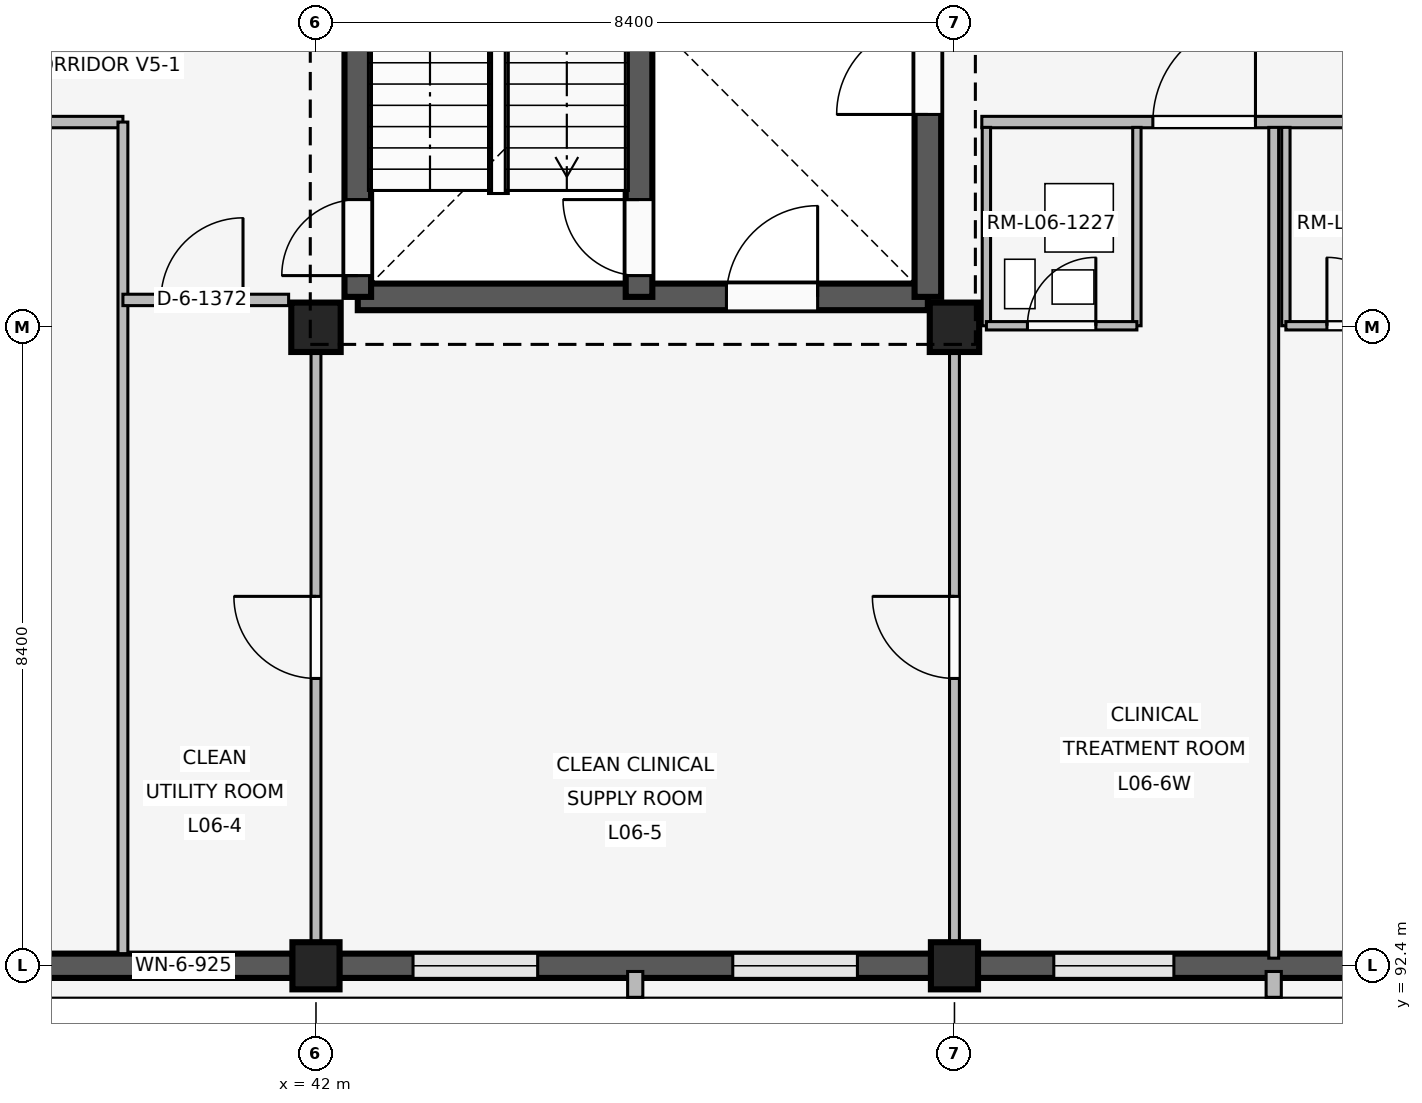
"""IFC4 building model, lengths in metres.
Left out: names, types, materials, properties, quantities, classifications, styles, units other than length and angle.
Written with IfcOpenShell. Run it as: python <this file> out.ifc"""

import sys

from ifc_helpers import new_model, si_unit, direction, frame, frame_2d, origin, origin_2d, place, context, subcontext, project, spatial, rectangle, extrude, element, fill, save


model = new_model("IFC4")
c1 = context("Model", 3, precision=1e-05, world=origin(), true_north=direction((0.0, 1.0)))
c2 = subcontext(c1, "Body", "Model", "MODEL_VIEW")
j1 = project(units=[si_unit("LENGTHUNIT", "METRE"), si_unit("PLANEANGLEUNIT", "RADIAN")], contexts=[c1])
p1 = place(None, origin())
s1 = spatial("IfcSite", under=j1, at=p1, CompositionType="ELEMENT")
p2 = place(p1, origin())
s2 = spatial("IfcBuilding", under=s1, at=p2, CompositionType="ELEMENT")
p3 = place(p2, frame((0.0, 0.0, 24.6)))
s3 = spatial("IfcBuildingStorey", under=s2, at=p3, CompositionType="ELEMENT", Elevation=24.6)
p4 = place(p3, frame((42.0, 92.4, 0.0), z_axis=(0.0, 0.0, 1.0), x_axis=(1.0, 0.0, 0.0)))
e1 = element("IfcColumn", 1, at=p4, inside=s3, PredefinedType="COLUMN", context=c2, shape_type="SweptSolid", body=[
    extrude(rectangle(XDim=0.62, YDim=0.62, at=origin_2d()), origin(), (0.0, 0.0, 1.0), 4.2),
])
p5 = place(p3, frame((42.0, 100.8, 0.0), z_axis=(0.0, 0.0, 1.0), x_axis=(1.0, 0.0, 0.0)))
e2 = element("IfcColumn", 2, at=p5, inside=s3, PredefinedType="COLUMN", context=c2, shape_type="SweptSolid", body=[
    extrude(rectangle(XDim=0.65, YDim=0.65, at=origin_2d()), origin(), (0.0, 0.0, 1.0), 4.2),
])
p6 = place(p3, frame((50.4, 92.4, 0.0), z_axis=(0.0, 0.0, 1.0), x_axis=(1.0, 0.0, 0.0)))
e3 = element("IfcColumn", 3, at=p6, inside=s3, PredefinedType="COLUMN", context=c2, shape_type="SweptSolid", body=[
    extrude(rectangle(XDim=0.62, YDim=0.62, at=origin_2d()), origin(), (0.0, 0.0, 1.0), 4.2),
])
p7 = place(p3, frame((50.4, 100.8, 0.0), z_axis=(0.0, 0.0, 1.0), x_axis=(1.0, 0.0, 0.0)))
e4 = element("IfcColumn", 4, at=p7, inside=s3, PredefinedType="COLUMN", context=c2, shape_type="SweptSolid", body=[
    extrude(rectangle(XDim=0.65, YDim=0.65, at=origin_2d()), origin(), (0.0, 0.0, 1.0), 4.2),
])
p8 = place(p3, frame((41.695, 92.4, 0.0), z_axis=(0.0, 0.0, 1.0), x_axis=(-1.0, 0.0, 0.0)))
e5 = element("IfcWall", 5, at=p8, inside=s3, PredefinedType="SOLIDWALL", context=c2, shape_type="SweptSolid", body=[
    extrude(rectangle(XDim=7.79, YDim=0.32, at=frame_2d((3.895, 0.0))), origin(), (0.0, 0.0, 1.0), 3.34),
])
p9 = place(p8, frame((0.89, 0.0, 0.85)))
e6 = element("IfcOpeningElement", 6, at=p9, cuts=e5, PredefinedType="OPENING", context=c2, shape_type="SweptSolid", body=[
    extrude(rectangle(XDim=1.1, YDim=1.6, at=frame_2d((0.55, 0.8))), frame((0.0, 0.17, 0.0), z_axis=(0.0, -1.0, 0.0), x_axis=(1.0, 0.0, 0.0)), (0.0, 0.0, 1.0), 0.34),
])
p10 = place(p8, frame((5.448, 0.0, 0.85)))
e7 = element("IfcOpeningElement", 7, at=p10, cuts=e5, PredefinedType="OPENING", context=c2, shape_type="SweptSolid", body=[
    extrude(rectangle(XDim=1.1, YDim=1.6, at=frame_2d((0.55, 0.8))), frame((0.0, 0.17, 0.0), z_axis=(0.0, -1.0, 0.0), x_axis=(1.0, 0.0, 0.0)), (0.0, 0.0, 1.0), 0.34),
])
p11 = place(p3, frame((50.095, 92.4, 0.0), z_axis=(0.0, 0.0, 1.0), x_axis=(-1.0, 0.0, 0.0)))
e8 = element("IfcWall", 8, at=p11, inside=s3, PredefinedType="SOLIDWALL", context=c2, shape_type="SweptSolid", body=[
    extrude(rectangle(XDim=7.79, YDim=0.32, at=frame_2d((3.895, 0.0))), origin(), (0.0, 0.0, 1.0), 3.34),
])
p12 = place(p11, frame((0.972, 0.0, 0.85)))
e9 = element("IfcOpeningElement", 9, at=p12, cuts=e8, PredefinedType="OPENING", context=c2, shape_type="SweptSolid", body=[
    extrude(rectangle(XDim=1.64, YDim=1.75, at=frame_2d((0.82, 0.875))), frame((0.0, 0.17, 0.0), z_axis=(0.0, -1.0, 0.0), x_axis=(1.0, 0.0, 0.0)), (0.0, 0.0, 1.0), 0.34),
])
p13 = place(p11, frame((5.178, 0.0, 0.85)))
e10 = element("IfcOpeningElement", 10, at=p13, cuts=e8, PredefinedType="OPENING", context=c2, shape_type="SweptSolid", body=[
    extrude(rectangle(XDim=1.64, YDim=1.75, at=frame_2d((0.82, 0.875))), frame((0.0, 0.17, 0.0), z_axis=(0.0, -1.0, 0.0), x_axis=(1.0, 0.0, 0.0)), (0.0, 0.0, 1.0), 0.34),
])
p14 = place(p3, frame((46.2, 92.325, 0.0), z_axis=(0.0, 0.0, 1.0), x_axis=(0.0, -1.0, 0.0)))
e11 = element("IfcWall", 11, at=p14, inside=s3, PredefinedType="ELEMENTEDWALL", context=c2, shape_type="SweptSolid", body=[
    extrude(rectangle(XDim=0.34, YDim=0.2, at=frame_2d((0.17, 0.0))), origin(), (0.0, 0.0, 1.0), 3.32),
])
p15 = place(p3, frame((58.495, 92.4, 0.0), z_axis=(0.0, 0.0, 1.0), x_axis=(-1.0, 0.0, 0.0)))
e12 = element("IfcWall", 12, at=p15, inside=s3, PredefinedType="SOLIDWALL", context=c2, shape_type="SweptSolid", body=[
    extrude(rectangle(XDim=7.79, YDim=0.32, at=frame_2d((3.895, 0.0))), origin(), (0.0, 0.0, 1.0), 3.34),
])
p16 = place(p15, frame((1.002, 0.0, 0.85)))
e13 = element("IfcOpeningElement", 13, at=p16, cuts=e12, PredefinedType="OPENING", context=c2, shape_type="SweptSolid", body=[
    extrude(rectangle(XDim=1.58, YDim=1.7, at=frame_2d((0.79, 0.85))), frame((0.0, 0.17, 0.0), z_axis=(0.0, -1.0, 0.0), x_axis=(1.0, 0.0, 0.0)), (0.0, 0.0, 1.0), 0.34),
])
p17 = place(p15, frame((5.208, 0.0, 0.85)))
e14 = element("IfcOpeningElement", 14, at=p17, cuts=e12, PredefinedType="OPENING", context=c2, shape_type="SweptSolid", body=[
    extrude(rectangle(XDim=1.58, YDim=1.7, at=frame_2d((0.79, 0.85))), frame((0.0, 0.17, 0.0), z_axis=(0.0, -1.0, 0.0), x_axis=(1.0, 0.0, 0.0)), (0.0, 0.0, 1.0), 0.34),
])
p18 = place(p3, frame((54.6, 92.325, 0.0), z_axis=(0.0, 0.0, 1.0), x_axis=(0.0, -1.0, 0.0)))
e15 = element("IfcWall", 15, at=p18, inside=s3, PredefinedType="ELEMENTEDWALL", context=c2, shape_type="SweptSolid", body=[
    extrude(rectangle(XDim=0.34, YDim=0.2, at=frame_2d((0.17, 0.0))), origin(), (0.0, 0.0, 1.0), 3.32),
])
p19 = place(p3, frame((42.55, 101.2, 0.0), z_axis=(0.0, 0.0, 1.0), x_axis=(1.0, 0.0, 0.0)))
e16 = element("IfcWall", 16, at=p19, inside=s3, PredefinedType="SHEAR", context=c2, shape_type="SweptSolid", body=[
    extrude(rectangle(XDim=7.5, YDim=0.35, at=frame_2d((3.75, 0.0))), origin(), (0.0, 0.0, 1.0), 3.92),
])
p20 = place(p19, frame((4.85, 0.0, 0.0)))
e17 = element("IfcOpeningElement", 17, at=p20, cuts=e16, PredefinedType="OPENING", context=c2, shape_type="SweptSolid", body=[
    extrude(rectangle(XDim=1.2, YDim=2.2, at=frame_2d((0.6, 1.1))), frame((0.0, 0.185, 0.0), z_axis=(0.0, -1.0, 0.0), x_axis=(1.0, 0.0, 0.0)), (0.0, 0.0, 1.0), 0.37),
])
p21 = place(p3, frame((42.55, 101.2, 0.0), z_axis=(0.0, 0.0, 1.0), x_axis=(0.0, 1.0, 0.0)))
e18 = element("IfcWall", 18, at=p21, inside=s3, PredefinedType="SHEAR", context=c2, shape_type="SweptSolid", body=[
    extrude(rectangle(XDim=7.55, YDim=0.35, at=frame_2d((3.775, 0.0))), origin(), (0.0, 0.0, 1.0), 3.92),
])
p22 = place(p21, frame((0.28, 0.0, 0.0)))
e19 = element("IfcOpeningElement", 19, at=p22, cuts=e18, PredefinedType="OPENING", context=c2, shape_type="SweptSolid", body=[
    extrude(rectangle(XDim=1.0, YDim=2.15, at=frame_2d((0.5, 1.075))), frame((0.0, 0.185, 0.0), z_axis=(0.0, -1.0, 0.0), x_axis=(1.0, 0.0, 0.0)), (0.0, 0.0, 1.0), 0.37),
])
p23 = place(p3, frame((50.05, 101.2, 0.0), z_axis=(0.0, 0.0, 1.0), x_axis=(0.0, 1.0, 0.0)))
e20 = element("IfcWall", 20, at=p23, inside=s3, PredefinedType="SHEAR", context=c2, shape_type="SweptSolid", body=[
    extrude(rectangle(XDim=7.55, YDim=0.35, at=frame_2d((3.775, 0.0))), origin(), (0.0, 0.0, 1.0), 3.92),
])
p24 = place(p23, frame((2.4, 0.0, 0.0)))
e21 = element("IfcOpeningElement", 21, at=p24, cuts=e20, PredefinedType="OPENING", context=c2, shape_type="SweptSolid", body=[
    extrude(rectangle(XDim=1.2, YDim=2.2, at=frame_2d((0.6, 1.1))), frame((0.0, 0.185, 0.0), z_axis=(0.0, -1.0, 0.0), x_axis=(1.0, 0.0, 0.0)), (0.0, 0.0, 1.0), 0.37),
])
p25 = place(p3, frame((46.25, 101.2, 0.0), z_axis=(0.0, 0.0, 1.0), x_axis=(0.0, 1.0, 0.0)))
e22 = element("IfcWall", 22, at=p25, inside=s3, PredefinedType="SHEAR", context=c2, shape_type="SweptSolid", body=[
    extrude(rectangle(XDim=7.55, YDim=0.35, at=frame_2d((3.775, 0.0))), origin(), (0.0, 0.0, 1.0), 3.92),
])
p26 = place(p25, frame((0.28, 0.0, 0.0)))
e23 = element("IfcOpeningElement", 23, at=p26, cuts=e22, PredefinedType="OPENING", context=c2, shape_type="SweptSolid", body=[
    extrude(rectangle(XDim=1.0, YDim=2.15, at=frame_2d((0.5, 1.075))), frame((0.0, 0.185, 0.0), z_axis=(0.0, -1.0, 0.0), x_axis=(1.0, 0.0, 0.0)), (0.0, 0.0, 1.0), 0.37),
])
p27 = place(p3, frame((33.74, 103.5, 0.0), z_axis=(0.0, 0.0, 1.0), x_axis=(1.0, 0.0, 0.0)))
e24 = element("IfcWall", 24, at=p27, inside=s3, PredefinedType="PARTITIONING", context=c2, shape_type="SweptSolid", body=[
    extrude(rectangle(XDim=5.72, YDim=0.15, at=frame_2d((2.86, 0.0))), origin(), (0.0, 0.0, 1.0), 3.32),
])
p28 = place(p27, frame((2.32, 0.0, 0.0)))
e25 = element("IfcOpeningElement", 25, at=p28, cuts=e24, PredefinedType="OPENING", context=c2, shape_type="SweptSolid", body=[
    extrude(rectangle(XDim=1.25, YDim=2.2, at=frame_2d((0.625, 1.1))), frame((0.0, 0.085, 0.0), z_axis=(0.0, -1.0, 0.0), x_axis=(1.0, 0.0, 0.0)), (0.0, 0.0, 1.0), 0.17),
])
p29 = place(p3, frame((39.46, 92.56, 0.0), z_axis=(0.0, 0.0, 1.0), x_axis=(0.0, 1.0, 0.0)))
e26 = element("IfcWall", 26, at=p29, inside=s3, PredefinedType="PARTITIONING", context=c2, shape_type="SweptSolid", body=[
    extrude(rectangle(XDim=10.94, YDim=0.13, at=frame_2d((5.47, 0.0))), origin(), (0.0, 0.0, 1.0), 3.32),
])
p30 = place(p3, frame((39.46, 101.16, 0.0), z_axis=(0.0, 0.0, 1.0), x_axis=(1.0, 0.0, 0.0)))
e27 = element("IfcWall", 27, at=p30, inside=s3, PredefinedType="PARTITIONING", context=c2, shape_type="SweptSolid", body=[
    extrude(rectangle(XDim=2.18, YDim=0.15, at=frame_2d((1.09, 0.0))), origin(), (0.0, 0.0, 1.0), 3.32),
])
p31 = place(p30, frame((0.5, 0.0, 0.0)))
e28 = element("IfcOpeningElement", 28, at=p31, cuts=e27, PredefinedType="OPENING", context=c2, shape_type="SweptSolid", body=[
    extrude(rectangle(XDim=1.08, YDim=2.15, at=frame_2d((0.54, 1.075))), frame((0.0, 0.085, 0.0), z_axis=(0.0, -1.0, 0.0), x_axis=(1.0, 0.0, 0.0)), (0.0, 0.0, 1.0), 0.17),
])
p32 = place(p3, frame((42.0, 92.54, 0.0), z_axis=(0.0, 0.0, 1.0), x_axis=(0.0, 1.0, 0.0)))
e29 = element("IfcWall", 29, at=p32, inside=s3, PredefinedType="PARTITIONING", context=c2, shape_type="SweptSolid", body=[
    extrude(rectangle(XDim=8.21, YDim=0.13, at=frame_2d((4.105, 0.0))), origin(), (0.0, 0.0, 1.0), 3.32),
])
p33 = place(p32, frame((3.64, 0.0, 0.0)))
e30 = element("IfcOpeningElement", 30, at=p33, cuts=e29, PredefinedType="OPENING", context=c2, shape_type="SweptSolid", body=[
    extrude(rectangle(XDim=1.08, YDim=2.15, at=frame_2d((0.54, 1.075))), frame((0.0, 0.075, 0.0), z_axis=(0.0, -1.0, 0.0), x_axis=(1.0, 0.0, 0.0)), (0.0, 0.0, 1.0), 0.15),
])
p34 = place(p3, frame((50.4, 92.54, 0.0), z_axis=(0.0, 0.0, 1.0), x_axis=(0.0, 1.0, 0.0)))
e31 = element("IfcWall", 31, at=p34, inside=s3, PredefinedType="PARTITIONING", context=c2, shape_type="SweptSolid", body=[
    extrude(rectangle(XDim=8.21, YDim=0.13, at=frame_2d((4.105, 0.0))), origin(), (0.0, 0.0, 1.0), 3.32),
])
p35 = place(p34, frame((3.64, 0.0, 0.0)))
e32 = element("IfcOpeningElement", 32, at=p35, cuts=e31, PredefinedType="OPENING", context=c2, shape_type="SweptSolid", body=[
    extrude(rectangle(XDim=1.08, YDim=2.15, at=frame_2d((0.54, 1.075))), frame((0.0, 0.075, 0.0), z_axis=(0.0, -1.0, 0.0), x_axis=(1.0, 0.0, 0.0)), (0.0, 0.0, 1.0), 0.15),
])
p36 = place(p3, frame((50.76, 103.5, 0.0), z_axis=(0.0, 0.0, 1.0), x_axis=(1.0, 0.0, 0.0)))
e33 = element("IfcWall", 33, at=p36, inside=s3, PredefinedType="PARTITIONING", context=c2, shape_type="SweptSolid", body=[
    extrude(rectangle(XDim=7.96, YDim=0.15, at=frame_2d((3.98, 0.0))), origin(), (0.0, 0.0, 1.0), 3.32),
])
p37 = place(p36, frame((2.25, 0.0, 0.0)))
e34 = element("IfcOpeningElement", 34, at=p37, cuts=e33, PredefinedType="OPENING", context=c2, shape_type="SweptSolid", body=[
    extrude(rectangle(XDim=1.35, YDim=2.25, at=frame_2d((0.675, 1.125))), frame((0.0, 0.085, 0.0), z_axis=(0.0, -1.0, 0.0), x_axis=(1.0, 0.0, 0.0)), (0.0, 0.0, 1.0), 0.17),
])
p38 = place(p36, frame((5.95, 0.0, 0.0)))
e35 = element("IfcOpeningElement", 35, at=p38, cuts=e33, PredefinedType="OPENING", context=c2, shape_type="SweptSolid", body=[
    extrude(rectangle(XDim=1.35, YDim=2.25, at=frame_2d((0.675, 1.125))), frame((0.0, 0.085, 0.0), z_axis=(0.0, -1.0, 0.0), x_axis=(1.0, 0.0, 0.0)), (0.0, 0.0, 1.0), 0.17),
])
p39 = place(p3, frame((54.6, 92.5, 0.0), z_axis=(0.0, 0.0, 1.0), x_axis=(0.0, 1.0, 0.0)))
e36 = element("IfcWall", 36, at=p39, inside=s3, PredefinedType="PARTITIONING", context=c2, shape_type="SweptSolid", body=[
    extrude(rectangle(XDim=10.93, YDim=0.13, at=frame_2d((5.465, 0.0))), origin(), (0.0, 0.0, 1.0), 3.32),
])
for number, where, z_axis, x_axis in (
    (37, (50.82, 100.82, 0.0), (0.0, 0.0, 1.0), (0.0, 1.0, 0.0)),
    (38, (52.8, 100.82, 0.0), (0.0, 0.0, 1.0), (0.0, 1.0, 0.0)),
):
    element("IfcWall", number, at=place(p3, frame(where, z_axis=z_axis, x_axis=x_axis)), inside=s3, PredefinedType="PARTITIONING", context=c2, shape_type="SweptSolid", body=[
        extrude(rectangle(XDim=2.61, YDim=0.11, at=frame_2d((1.305, 0.0))), origin(), (0.0, 0.0, 1.0), 3.32),
    ])
p40 = place(p3, frame((50.82, 100.82, 0.0), z_axis=(0.0, 0.0, 1.0), x_axis=(1.0, 0.0, 0.0)))
e39 = element("IfcWall", 39, at=p40, inside=s3, PredefinedType="PARTITIONING", context=c2, shape_type="SweptSolid", body=[
    extrude(rectangle(XDim=1.98, YDim=0.11, at=frame_2d((0.99, 0.0))), origin(), (0.0, 0.0, 1.0), 3.32),
])
p41 = place(p40, frame((0.54, 0.0, 0.0)))
e40 = element("IfcOpeningElement", 40, at=p41, cuts=e39, PredefinedType="OPENING", context=c2, shape_type="SweptSolid", body=[
    extrude(rectangle(XDim=0.9, YDim=2.1, at=frame_2d((0.45, 1.05))), frame((0.0, 0.065, 0.0), z_axis=(0.0, -1.0, 0.0), x_axis=(1.0, 0.0, 0.0)), (0.0, 0.0, 1.0), 0.13),
])
p42 = place(p3, frame((54.76, 100.82, 0.0), z_axis=(0.0, 0.0, 1.0), x_axis=(0.0, 1.0, 0.0)))
e41 = element("IfcWall", 41, at=p42, inside=s3, PredefinedType="PARTITIONING", context=c2, shape_type="SweptSolid", body=[
    extrude(rectangle(XDim=2.61, YDim=0.11, at=frame_2d((1.305, 0.0))), origin(), (0.0, 0.0, 1.0), 3.32),
])
p43 = place(p3, frame((54.76, 100.82, 0.0), z_axis=(0.0, 0.0, 1.0), x_axis=(1.0, 0.0, 0.0)))
e42 = element("IfcWall", 42, at=p43, inside=s3, PredefinedType="PARTITIONING", context=c2, shape_type="SweptSolid", body=[
    extrude(rectangle(XDim=1.98, YDim=0.11, at=frame_2d((0.99, 0.0))), origin(), (0.0, 0.0, 1.0), 3.32),
])
p44 = place(p43, frame((0.54, 0.0, 0.0)))
e43 = element("IfcOpeningElement", 43, at=p44, cuts=e42, PredefinedType="OPENING", context=c2, shape_type="SweptSolid", body=[
    extrude(rectangle(XDim=0.9, YDim=2.1, at=frame_2d((0.45, 1.05))), frame((0.0, 0.065, 0.0), z_axis=(0.0, -1.0, 0.0), x_axis=(1.0, 0.0, 0.0)), (0.0, 0.0, 1.0), 0.13),
])
p45 = place(p9, origin())
e44 = element("IfcWindow", 44, at=p45, inside=s3, PartitioningType="SINGLE_PANEL", PredefinedType="WINDOW", context=c2, shape_type="SweptSolid", body=[
    extrude(rectangle(XDim=1.1, YDim=1.6, at=frame_2d((0.55, 0.8))), frame((0.0, 0.03, 0.0), z_axis=(0.0, -1.0, 0.0), x_axis=(1.0, 0.0, 0.0)), (0.0, 0.0, 1.0), 0.06),
])
fill(e6, e44)
p46 = place(p12, origin())
e45 = element("IfcWindow", 45, at=p46, inside=s3, PartitioningType="SINGLE_PANEL", PredefinedType="WINDOW", context=c2, shape_type="SweptSolid", body=[
    extrude(rectangle(XDim=1.64, YDim=1.75, at=frame_2d((0.82, 0.875))), frame((0.0, 0.03, 0.0), z_axis=(0.0, -1.0, 0.0), x_axis=(1.0, 0.0, 0.0)), (0.0, 0.0, 1.0), 0.06),
])
fill(e9, e45)
p47 = place(p13, origin())
e46 = element("IfcWindow", 46, at=p47, inside=s3, PartitioningType="SINGLE_PANEL", PredefinedType="WINDOW", context=c2, shape_type="SweptSolid", body=[
    extrude(rectangle(XDim=1.64, YDim=1.75, at=frame_2d((0.82, 0.875))), frame((0.0, 0.03, 0.0), z_axis=(0.0, -1.0, 0.0), x_axis=(1.0, 0.0, 0.0)), (0.0, 0.0, 1.0), 0.06),
])
fill(e10, e46)
p48 = place(p17, origin())
e47 = element("IfcWindow", 47, at=p48, inside=s3, PartitioningType="SINGLE_PANEL", PredefinedType="WINDOW", context=c2, shape_type="SweptSolid", body=[
    extrude(rectangle(XDim=1.58, YDim=1.7, at=frame_2d((0.79, 0.85))), frame((0.0, 0.03, 0.0), z_axis=(0.0, -1.0, 0.0), x_axis=(1.0, 0.0, 0.0)), (0.0, 0.0, 1.0), 0.06),
])
fill(e14, e47)
p49 = place(p24, origin())
e48 = element("IfcDoor", 48, at=p49, inside=s3, OperationType="SINGLE_SWING_LEFT", PredefinedType="DOOR", context=c2, shape_type="SweptSolid", body=[
    extrude(rectangle(XDim=1.2, YDim=2.2, at=frame_2d((0.6, 1.1))), frame((0.0, 0.025, 0.0), z_axis=(0.0, -1.0, 0.0), x_axis=(1.0, 0.0, 0.0)), (0.0, 0.0, 1.0), 0.05),
])
fill(e21, e48)
p50 = place(p20, origin())
e49 = element("IfcDoor", 49, at=p50, inside=s3, OperationType="SINGLE_SWING_RIGHT", PredefinedType="DOOR", context=c2, shape_type="SweptSolid", body=[
    extrude(rectangle(XDim=1.2, YDim=2.2, at=frame_2d((0.6, 1.1))), frame((0.0, 0.025, 0.0), z_axis=(0.0, -1.0, 0.0), x_axis=(1.0, 0.0, 0.0)), (0.0, 0.0, 1.0), 0.05),
])
fill(e17, e49)
p51 = place(p22, origin())
e50 = element("IfcDoor", 50, at=p51, inside=s3, OperationType="SINGLE_SWING_LEFT", PredefinedType="DOOR", context=c2, shape_type="SweptSolid", body=[
    extrude(rectangle(XDim=1.0, YDim=2.15, at=frame_2d((0.5, 1.075))), frame((0.0, 0.025, 0.0), z_axis=(0.0, -1.0, 0.0), x_axis=(1.0, 0.0, 0.0)), (0.0, 0.0, 1.0), 0.05),
])
fill(e19, e50)
p52 = place(p26, origin())
e51 = element("IfcDoor", 51, at=p52, inside=s3, OperationType="SINGLE_SWING_RIGHT", PredefinedType="DOOR", context=c2, shape_type="SweptSolid", body=[
    extrude(rectangle(XDim=1.0, YDim=2.15, at=frame_2d((0.5, 1.075))), frame((0.0, 0.025, 0.0), z_axis=(0.0, -1.0, 0.0), x_axis=(1.0, 0.0, 0.0)), (0.0, 0.0, 1.0), 0.05),
])
fill(e23, e51)
p53 = place(p31, origin())
e52 = element("IfcDoor", 52, at=p53, inside=s3, OperationType="SINGLE_SWING_RIGHT", PredefinedType="DOOR", context=c2, shape_type="SweptSolid", body=[
    extrude(rectangle(XDim=1.08, YDim=2.15, at=frame_2d((0.54, 1.075))), frame((0.0, 0.025, 0.0), z_axis=(0.0, -1.0, 0.0), x_axis=(1.0, 0.0, 0.0)), (0.0, 0.0, 1.0), 0.05),
])
fill(e28, e52)
p54 = place(p33, origin())
e53 = element("IfcDoor", 53, at=p54, inside=s3, OperationType="SINGLE_SWING_RIGHT", PredefinedType="DOOR", context=c2, shape_type="SweptSolid", body=[
    extrude(rectangle(XDim=1.08, YDim=2.15, at=frame_2d((0.54, 1.075))), frame((0.0, 0.025, 0.0), z_axis=(0.0, -1.0, 0.0), x_axis=(1.0, 0.0, 0.0)), (0.0, 0.0, 1.0), 0.05),
])
fill(e30, e53)
p55 = place(p35, origin())
e54 = element("IfcDoor", 54, at=p55, inside=s3, OperationType="SINGLE_SWING_RIGHT", PredefinedType="DOOR", context=c2, shape_type="SweptSolid", body=[
    extrude(rectangle(XDim=1.08, YDim=2.15, at=frame_2d((0.54, 1.075))), frame((0.0, 0.025, 0.0), z_axis=(0.0, -1.0, 0.0), x_axis=(1.0, 0.0, 0.0)), (0.0, 0.0, 1.0), 0.05),
])
fill(e32, e54)
p56 = place(p37, origin())
e55 = element("IfcDoor", 55, at=p56, inside=s3, OperationType="SINGLE_SWING_RIGHT", PredefinedType="DOOR", context=c2, shape_type="SweptSolid", body=[
    extrude(rectangle(XDim=1.35, YDim=2.25, at=frame_2d((0.675, 1.125))), frame((0.0, 0.025, 0.0), z_axis=(0.0, -1.0, 0.0), x_axis=(1.0, 0.0, 0.0)), (0.0, 0.0, 1.0), 0.05),
])
fill(e34, e55)
p57 = place(p41, origin())
e56 = element("IfcDoor", 56, at=p57, inside=s3, OperationType="SINGLE_SWING_RIGHT", PredefinedType="DOOR", context=c2, shape_type="SweptSolid", body=[
    extrude(rectangle(XDim=0.9, YDim=2.1, at=frame_2d((0.45, 1.05))), frame((0.0, 0.025, 0.0), z_axis=(0.0, -1.0, 0.0), x_axis=(1.0, 0.0, 0.0)), (0.0, 0.0, 1.0), 0.05),
])
fill(e40, e56)
p58 = place(p44, origin())
e57 = element("IfcDoor", 57, at=p58, inside=s3, OperationType="SINGLE_SWING_LEFT", PredefinedType="DOOR", context=c2, shape_type="SweptSolid", body=[
    extrude(rectangle(XDim=0.9, YDim=2.1, at=frame_2d((0.45, 1.05))), frame((0.0, 0.025, 0.0), z_axis=(0.0, -1.0, 0.0), x_axis=(1.0, 0.0, 0.0)), (0.0, 0.0, 1.0), 0.05),
])
fill(e43, e57)
save(model, sys.argv[1])
